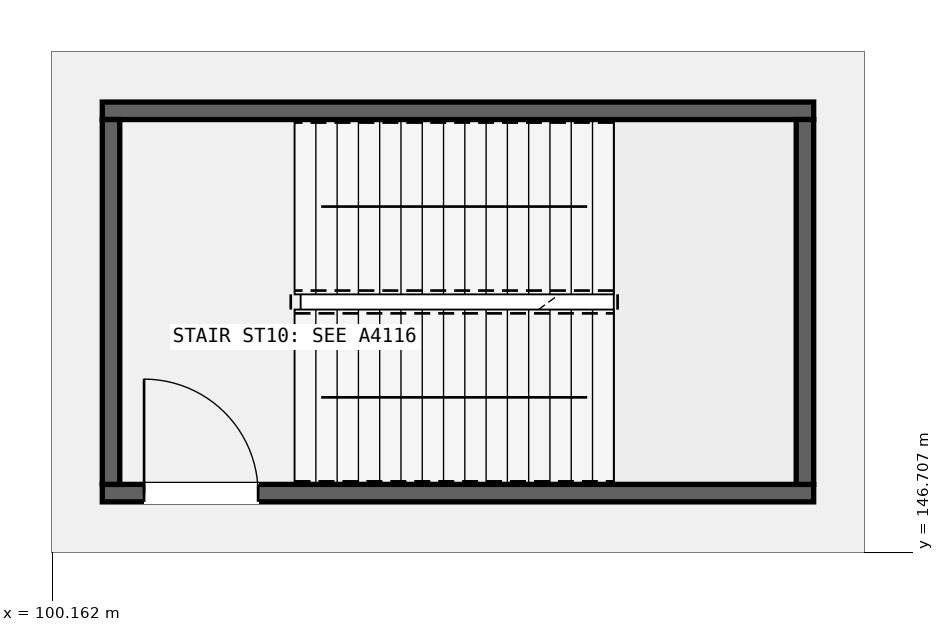
"""IFC4 building model, lengths in metres.
Left out: names, types, materials, properties, quantities, classifications, styles, units other than length and angle.
Written with IfcOpenShell. Run it as: python <this file> out.ifc"""

import sys

from ifc_helpers import new_model, si_unit, direction, frame, frame_2d, origin, place, context, subcontext, project, spatial, rectangle, extrude, element, fill, save


model = new_model("IFC4")
c1 = context("Model", 3, precision=1e-05, world=origin(), true_north=direction((0.0, 1.0)))
c2 = subcontext(c1, "Body", "Model", "MODEL_VIEW")
j1 = project(units=[si_unit("LENGTHUNIT", "METRE"), si_unit("PLANEANGLEUNIT", "RADIAN")], contexts=[c1])
p1 = place(None, origin())
s1 = spatial("IfcSite", under=j1, at=p1, CompositionType="ELEMENT")
p2 = place(p1, origin())
s2 = spatial("IfcBuilding", under=s1, at=p2, CompositionType="ELEMENT")
p3 = place(p2, origin())
s3 = spatial("IfcBuildingStorey", under=s2, at=p3, CompositionType="ELEMENT", Elevation=0.0)
p4 = place(p3, frame((100.82, 147.485, 0.0), z_axis=(0.0, 0.0, 1.0), x_axis=(1.0, 0.0, 0.0)))
e1 = element("IfcWall", 1, at=p4, inside=s3, PredefinedType="SHEAR", context=c2, shape_type="SweptSolid", body=[
    extrude(rectangle(XDim=9.36, YDim=0.23, at=frame_2d((4.68, 0.0))), origin(), (0.0, 0.0, 1.0), 5.14),
])
p5 = place(p4, frame((0.55, 0.0, 0.0)))
e2 = element("IfcOpeningElement", 2, at=p5, cuts=e1, PredefinedType="OPENING", context=c2, shape_type="SweptSolid", body=[
    extrude(rectangle(XDim=1.5, YDim=2.2, at=frame_2d((0.75, 1.1))), frame((0.0, 0.125, 0.0), z_axis=(0.0, -1.0, 0.0), x_axis=(1.0, 0.0, 0.0)), (0.0, 0.0, 1.0), 0.25),
])
p6 = place(p3, frame((100.82, 152.515, 0.0), z_axis=(0.0, 0.0, 1.0), x_axis=(1.0, 0.0, 0.0)))
e3 = element("IfcWall", 3, at=p6, inside=s3, PredefinedType="SHEAR", context=c2, shape_type="SweptSolid", body=[
    extrude(rectangle(XDim=9.36, YDim=0.23, at=frame_2d((4.68, 0.0))), origin(), (0.0, 0.0, 1.0), 5.14),
])
for number, where, z_axis, x_axis in (
    (4, (100.935, 147.6, 0.0), (0.0, 0.0, 1.0), (0.0, 1.0, 0.0)),
    (5, (110.065, 147.6, 0.0), (0.0, 0.0, 1.0), (0.0, 1.0, 0.0)),
):
    element("IfcWall", number, at=place(p3, frame(where, z_axis=z_axis, x_axis=x_axis)), inside=s3, PredefinedType="SHEAR", context=c2, shape_type="SweptSolid", body=[
        extrude(rectangle(XDim=4.8, YDim=0.23, at=frame_2d((2.4, 0.0))), origin(), (0.0, 0.0, 1.0), 5.14),
    ])
p7 = place(p5, origin())
e6 = element("IfcDoor", 6, at=p7, inside=s3, OperationType="SINGLE_SWING_LEFT", PredefinedType="DOOR", context=c2, shape_type="SweptSolid", body=[
    extrude(rectangle(XDim=1.5, YDim=2.2, at=frame_2d((0.75, 1.1))), frame((0.0, 0.025, 0.0), z_axis=(0.0, -1.0, 0.0), x_axis=(1.0, 0.0, 0.0)), (0.0, 0.0, 1.0), 0.05),
])
fill(e2, e6)
save(model, sys.argv[1])
